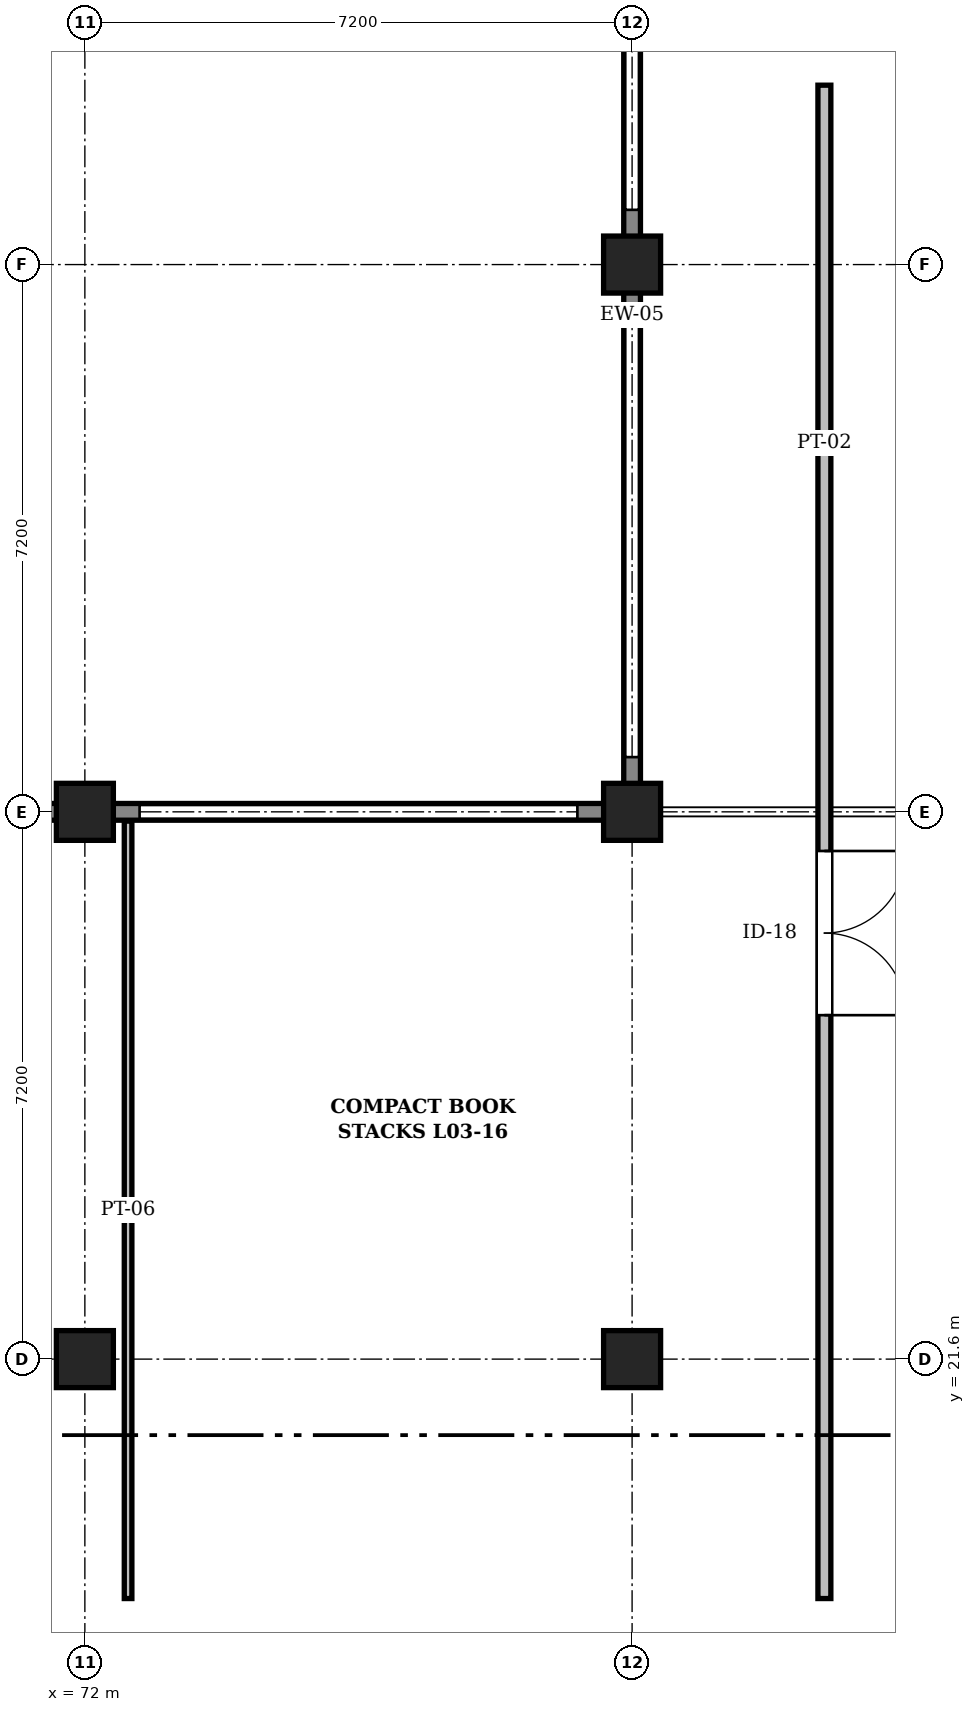
"""IFC4 building model, lengths in metres.
Left out: names, types, materials, properties, quantities, classifications, styles, units other than length and angle.
Written with IfcOpenShell. Run it as: python <this file> out.ifc"""

import sys

from ifc_helpers import new_model, si_unit, direction, frame, frame_2d, origin, origin_2d, place, context, subcontext, project, spatial, rectangle, extrude, element, fill, save


model = new_model("IFC4")
c1 = context("Model", 3, precision=1e-05, world=origin(), true_north=direction((0.0, 1.0)))
c2 = subcontext(c1, "Body", "Model", "MODEL_VIEW")
j1 = project(units=[si_unit("LENGTHUNIT", "METRE"), si_unit("PLANEANGLEUNIT", "RADIAN")], contexts=[c1])
p1 = place(None, origin())
s1 = spatial("IfcSite", under=j1, at=p1, CompositionType="ELEMENT")
p2 = place(p1, origin())
s2 = spatial("IfcBuilding", under=s1, at=p2, CompositionType="ELEMENT")
p3 = place(p2, frame((0.0, 0.0, 14.4)))
s3 = spatial("IfcBuildingStorey", under=s2, at=p3, CompositionType="ELEMENT", Elevation=14.4)
for number, where, z_axis, x_axis in (
    (1, (72.0, 21.6, 0.0), (0.0, 0.0, 1.0), (1.0, 0.0, 0.0)),
    (2, (72.0, 28.8, 0.0), (0.0, 0.0, 1.0), (1.0, 0.0, 0.0)),
    (3, (79.2, 21.6, 0.0), (0.0, 0.0, 1.0), (1.0, 0.0, 0.0)),
    (4, (79.2, 28.8, 0.0), (0.0, 0.0, 1.0), (1.0, 0.0, 0.0)),
    (5, (79.2, 36.0, 0.0), (0.0, 0.0, 1.0), (1.0, 0.0, 0.0)),
):
    element("IfcColumn", number, at=place(p3, frame(where, z_axis=z_axis, x_axis=x_axis)), inside=s3, PredefinedType="COLUMN", context=c2, shape_type="SweptSolid", body=[
        extrude(rectangle(XDim=0.75, YDim=0.75, at=origin_2d()), origin(), (0.0, 0.0, 1.0), 4.5),
    ])
p4 = place(p3, frame((79.2, 28.952, 0.0), z_axis=(0.0, 0.0, 1.0), x_axis=(0.0, 1.0, 0.0)))
e6 = element("IfcWall", 6, at=p4, inside=s3, PredefinedType="SOLIDWALL", context=c2, shape_type="SweptSolid", body=[
    extrude(rectangle(XDim=7.048, YDim=0.22, at=frame_2d((3.524, 0.0))), origin(), (0.0, 0.0, 1.0), 1.24),
])
for number, where, z_axis, x_axis in (
    (7, (79.2, 36.0, 0.0), (0.0, 0.0, 1.0), (0.0, 1.0, 0.0)),
    (8, (64.8, 28.8, 0.0), (0.0, 0.0, 1.0), (1.0, 0.0, 0.0)),
):
    element("IfcWall", number, at=place(p3, frame(where, z_axis=z_axis, x_axis=x_axis)), inside=s3, PredefinedType="SOLIDWALL", context=c2, shape_type="SweptSolid", body=[
        extrude(rectangle(XDim=7.2, YDim=0.22, at=frame_2d((3.6, 0.0))), origin(), (0.0, 0.0, 1.0), 1.24),
    ])
p5 = place(p3, frame((72.0, 28.8, 0.0), z_axis=(0.0, 0.0, 1.0), x_axis=(1.0, 0.0, 0.0)))
e9 = element("IfcWall", 9, at=p5, inside=s3, PredefinedType="SOLIDWALL", context=c2, shape_type="SweptSolid", body=[
    extrude(rectangle(XDim=7.35, YDim=0.22, at=frame_2d((3.675, 0.0))), origin(), (0.0, 0.0, 1.0), 1.24),
])
p6 = place(p3, frame((81.73, 18.45, 0.0), z_axis=(0.0, 0.0, 1.0), x_axis=(0.0, 1.0, 0.0)))
e10 = element("IfcWall", 10, at=p6, inside=s3, PredefinedType="PARTITIONING", context=c2, shape_type="SweptSolid", body=[
    extrude(rectangle(XDim=19.91, YDim=0.17, at=frame_2d((9.955, 0.0))), origin(), (0.0, 0.0, 1.0), 4.16),
])
p7 = place(p6, frame((7.675, 0.0, 0.0)))
e11 = element("IfcOpeningElement", 11, at=p7, cuts=e10, PredefinedType="OPENING", context=c2, shape_type="SweptSolid", body=[
    extrude(rectangle(XDim=2.16, YDim=2.35, at=frame_2d((1.08, 1.175))), frame((0.0, 0.097, 0.0), z_axis=(0.0, -1.0, 0.0), x_axis=(1.0, 0.0, 0.0)), (0.0, 0.0, 1.0), 0.194),
])
p8 = place(p3, frame((72.569, 18.45, 0.0), z_axis=(0.0, 0.0, 1.0), x_axis=(0.0, 1.0, 0.0)))
e12 = element("IfcWall", 12, at=p8, inside=s3, PredefinedType="PARTITIONING", context=c2, shape_type="SweptSolid", body=[
    extrude(rectangle(XDim=10.228, YDim=0.1, at=frame_2d((5.114, 0.0))), origin(), (0.0, 0.0, 1.0), 4.16),
])
p9 = place(p7, frame((2.16, 0.0, 0.0), z_axis=(0.0, 0.0, 1.0), x_axis=(-1.0, 0.0, 0.0)))
e13 = element("IfcDoor", 13, at=p9, inside=s3, OperationType="DOUBLE_DOOR_SINGLE_SWING", PredefinedType="DOOR", context=c2, shape_type="SweptSolid", body=[
    extrude(rectangle(XDim=2.16, YDim=2.35, at=frame_2d((1.08, 1.175))), frame((0.0, 0.025, 0.0), z_axis=(0.0, -1.0, 0.0), x_axis=(1.0, 0.0, 0.0)), (0.0, 0.0, 1.0), 0.05),
])
fill(e11, e13)
save(model, sys.argv[1])
